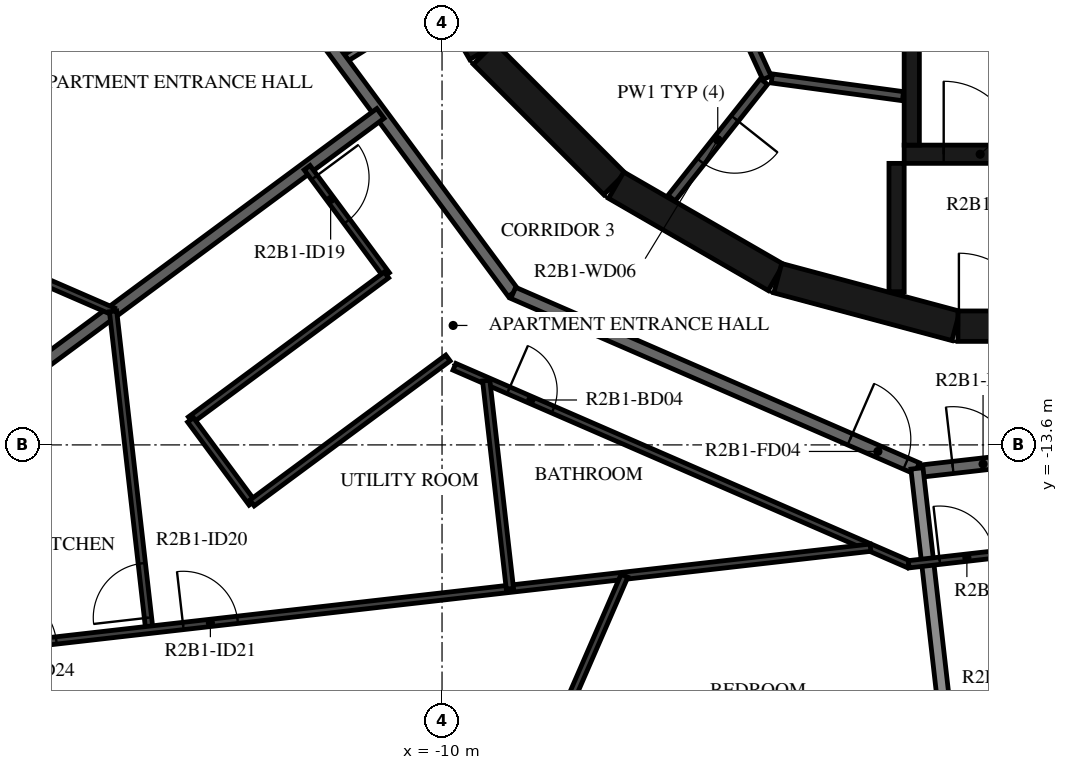
"""IFC4 building model, lengths in metres.
Left out: names, types, materials, properties, quantities, classifications, styles, units other than length and angle.
Written with IfcOpenShell. Run it as: python <this file> out.ifc"""

import sys

from ifc_helpers import new_model, si_unit, direction, frame, frame_2d, origin, place, context, subcontext, project, spatial, rectangle, extrude, element, fill, save


model = new_model("IFC4")
c1 = context("Model", 3, precision=1e-05, world=origin(), true_north=direction((0.0, 1.0)))
c2 = subcontext(c1, "Body", "Model", "MODEL_VIEW")
j1 = project(units=[si_unit("LENGTHUNIT", "METRE"), si_unit("PLANEANGLEUNIT", "RADIAN")], contexts=[c1])
p1 = place(None, origin())
s1 = spatial("IfcSite", under=j1, at=p1, CompositionType="ELEMENT")
p2 = place(p1, origin())
s2 = spatial("IfcBuilding", under=s1, at=p2, CompositionType="ELEMENT")
p3 = place(p2, frame((0.0, 0.0, 87.2)))
s3 = spatial("IfcBuildingStorey", under=s2, at=p3, CompositionType="ELEMENT", Elevation=87.2)
p4 = place(p3, frame((-10.845, -4.51, 0.0), z_axis=(0.0, 0.0, 1.0), x_axis=(0.500087131594, -0.865975092491, 0.0)))
e1 = element("IfcWall", 1, at=p4, inside=s3, PredefinedType="SHEAR", context=c2, shape_type="SweptSolid", body=[
    extrude(rectangle(XDim=3.033, YDim=0.5, at=frame_2d((1.516, 0.0))), origin(), (0.0, 0.0, 1.0), 3.12),
])
p5 = place(p3, frame((-9.308, -7.164, 0.0), z_axis=(0.0, 0.0, 1.0), x_axis=(0.707106781187, -0.707106781187, 0.0)))
e2 = element("IfcWall", 2, at=p5, inside=s3, PredefinedType="SHEAR", context=c2, shape_type="SweptSolid", body=[
    extrude(rectangle(XDim=3.032, YDim=0.5, at=frame_2d((1.516, 0.0))), origin(), (0.0, 0.0, 1.0), 3.12),
])
for number, where, z_axis, x_axis in (
    (3, (-7.137, -9.329, 0.0), (0.0, 0.0, 1.0), (0.866, -0.5, 0.0)),
    (4, (-4.479, -10.858, 0.0), (0.0, 0.0, 1.0), (0.966, -0.259, 0.0)),
):
    element("IfcWall", number, at=place(p3, frame(where, z_axis=z_axis, x_axis=x_axis)), inside=s3, PredefinedType="SHEAR", context=c2, shape_type="SweptSolid", body=[
        extrude(rectangle(XDim=3.033, YDim=0.5, at=frame_2d((1.516, 0.0))), origin(), (0.0, 0.0, 1.0), 3.12),
    ])
p6 = place(p3, frame((-1.516, -11.647, 0.0), z_axis=(0.0, 0.0, 1.0), x_axis=(1.0, 0.0, 0.0)))
e5 = element("IfcWall", 5, at=p6, inside=s3, PredefinedType="SHEAR", context=c2, shape_type="SweptSolid", body=[
    extrude(rectangle(XDim=3.033, YDim=0.5, at=frame_2d((1.516, 0.0))), origin(), (0.0, 0.0, 1.0), 3.12),
])
p7 = place(p6, frame((0.016, 0.0, 0.0)))
e6 = element("IfcOpeningElement", 6, at=p7, cuts=e5, PredefinedType="OPENING", context=c2, shape_type="SweptSolid", body=[
    extrude(rectangle(XDim=1.2, YDim=2.1, at=frame_2d((0.6, 1.05))), frame((0.0, 0.26, 0.0), z_axis=(0.0, -1.0, 0.0), x_axis=(1.0, 0.0, 0.0)), (0.0, 0.0, 1.0), 0.52),
])
p8 = place(p3, frame((-2.275, -8.67, 0.0), z_axis=(0.0, 0.0, 1.0), x_axis=(0.0, 1.0, 0.0)))
e7 = element("IfcWall", 7, at=p8, inside=s3, PredefinedType="SHEAR", context=c2, shape_type="SweptSolid", body=[
    extrude(rectangle(XDim=3.32, YDim=0.25, at=frame_2d((1.66, 0.0))), origin(), (0.0, 0.0, 1.0), 3.12),
])
p9 = place(p3, frame((-2.4, -8.82, 0.0), z_axis=(0.0, 0.0, 1.0), x_axis=(1.0, 0.0, 0.0)))
e8 = element("IfcWall", 8, at=p9, inside=s3, PredefinedType="SHEAR", context=c2, shape_type="SweptSolid", body=[
    extrude(rectangle(XDim=2.5, YDim=0.3, at=frame_2d((1.25, 0.0))), origin(), (0.0, 0.0, 1.0), 3.12),
])
p10 = place(p9, frame((0.65, 0.0, 0.0)))
e9 = element("IfcOpeningElement", 9, at=p10, cuts=e8, PredefinedType="OPENING", context=c2, shape_type="SweptSolid", body=[
    extrude(rectangle(XDim=1.2, YDim=2.1, at=frame_2d((0.6, 1.05))), frame((0.0, 0.16, 0.0), z_axis=(0.0, -1.0, 0.0), x_axis=(1.0, 0.0, 0.0)), (0.0, 0.0, 1.0), 0.32),
])
p11 = place(p3, frame((-2.525, -8.97, 0.0), z_axis=(0.0, 0.0, 1.0), x_axis=(0.0, -1.0, 0.0)))
e10 = element("IfcWall", 10, at=p11, inside=s3, PredefinedType="SHEAR", context=c2, shape_type="SweptSolid", body=[
    extrude(rectangle(XDim=2.11, YDim=0.25, at=frame_2d((1.055, 0.0))), origin(), (0.0, 0.0, 1.0), 3.12),
])
p12 = place(p3, frame((-5.795, -5.086, 0.0), z_axis=(0.0, 0.0, 1.0), x_axis=(0.417887867606, -0.908498613157, 0.0)))
e11 = element("IfcWall", 11, at=p12, inside=s3, PredefinedType="PARTITIONING", context=c2, shape_type="SweptSolid", body=[
    extrude(rectangle(XDim=2.726, YDim=0.15, at=frame_2d((1.363, 0.0))), origin(), (0.0, 0.0, 1.0), 3.12),
])
p13 = place(p12, frame((0.913, 0.0, 0.0)))
e12 = element("IfcOpeningElement", 12, at=p13, cuts=e11, PredefinedType="OPENING", context=c2, shape_type="SweptSolid", body=[
    extrude(rectangle(XDim=0.9, YDim=2.1, at=frame_2d((0.45, 1.05))), frame((0.0, 0.085, 0.0), z_axis=(0.0, -1.0, 0.0), x_axis=(1.0, 0.0, 0.0)), (0.0, 0.0, 1.0), 0.17),
])
p14 = place(p3, frame((-4.706, -7.625, 0.0), z_axis=(0.0, 0.0, 1.0), x_axis=(-0.621392599334, -0.783499353856, 0.0)))
e13 = element("IfcWall", 13, at=p14, inside=s3, PredefinedType="PARTITIONING", context=c2, shape_type="SweptSolid", body=[
    extrude(rectangle(XDim=2.447, YDim=0.15, at=frame_2d((1.224, 0.0))), origin(), (0.0, 0.0, 1.0), 3.12),
])
p15 = place(p14, frame((0.774, 0.0, 0.0)))
e14 = element("IfcOpeningElement", 14, at=p15, cuts=e13, PredefinedType="OPENING", context=c2, shape_type="SweptSolid", body=[
    extrude(rectangle(XDim=0.9, YDim=2.1, at=frame_2d((0.45, 1.05))), frame((0.0, 0.085, 0.0), z_axis=(0.0, -1.0, 0.0), x_axis=(1.0, 0.0, 0.0)), (0.0, 0.0, 1.0), 0.17),
])
p16 = place(p3, frame((-2.42, -7.865, 0.0), z_axis=(0.0, 0.0, 1.0), x_axis=(-0.990972299108, 0.134066783362, 0.0)))
e15 = element("IfcWall", 15, at=p16, inside=s3, PredefinedType="PARTITIONING", context=c2, shape_type="SweptSolid", body=[
    extrude(rectangle(XDim=2.176, YDim=0.15, at=frame_2d((1.088, 0.0))), origin(), (0.0, 0.0, 1.0), 3.12),
])
p17 = place(p3, frame((-11.654, -7.282, 0.0), z_axis=(0.0, 0.0, 1.0), x_axis=(0.848117698675, 0.529807860638, 0.0)))
e16 = element("IfcWall", 16, at=p17, inside=s3, PredefinedType="PARTITIONING", context=c2, shape_type="SweptSolid", body=[
    extrude(rectangle(XDim=1.838, YDim=0.12, at=frame_2d((0.919, 0.0))), origin(), (0.0, 0.0, 1.0), 3.12),
])
p18 = place(p17, frame((0.115, 0.0, 0.0)))
e17 = element("IfcOpeningElement", 17, at=p18, cuts=e16, PredefinedType="OPENING", context=c2, shape_type="SweptSolid", body=[
    extrude(rectangle(XDim=1.2, YDim=2.1, at=frame_2d((0.6, 1.05))), frame((0.0, 0.07, 0.0), z_axis=(0.0, -1.0, 0.0), x_axis=(1.0, 0.0, 0.0)), (0.0, 0.0, 1.0), 0.14),
])
p19 = place(p3, frame((-13.196, -5.198, 0.0), z_axis=(0.0, 0.0, 1.0), x_axis=(0.594805187394, -0.803869883159, 0.0)))
e18 = element("IfcWall", 18, at=p19, inside=s3, PredefinedType="STANDARD", context=c2, shape_type="SweptSolid", body=[
    extrude(rectangle(XDim=7.342, YDim=0.2, at=frame_2d((3.671, 0.0))), origin(), (0.0, 0.0, 1.0), 3.12),
])
p20 = place(p3, frame((-8.829, -11.1, 0.0), z_axis=(0.0, 0.0, 1.0), x_axis=(0.917063622491, -0.398740908742, 0.0)))
e19 = element("IfcWall", 19, at=p20, inside=s3, PredefinedType="STANDARD", context=c2, shape_type="SweptSolid", body=[
    extrude(rectangle(XDim=7.24, YDim=0.2, at=frame_2d((3.62, 0.0))), origin(), (0.0, 0.0, 1.0), 3.12),
])
p21 = place(p20, frame((6.04, 0.0, 0.0)))
e20 = element("IfcOpeningElement", 20, at=p21, cuts=e19, PredefinedType="OPENING", context=c2, shape_type="SweptSolid", body=[
    extrude(rectangle(XDim=1.0, YDim=2.1, at=frame_2d((0.5, 1.05))), frame((0.0, 0.11, 0.0), z_axis=(0.0, -1.0, 0.0), x_axis=(1.0, 0.0, 0.0)), (0.0, 0.0, 1.0), 0.22),
])
p22 = place(p3, frame((-2.096, -14.028, 0.0), z_axis=(0.0, 0.0, 1.0), x_axis=(0.993569170114, 0.113226782163, 0.0)))
e21 = element("IfcWall", 21, at=p22, inside=s3, PredefinedType="STANDARD", context=c2, shape_type="SweptSolid", body=[
    extrude(rectangle(XDim=7.342, YDim=0.2, at=frame_2d((3.671, 0.0))), origin(), (0.0, 0.0, 1.0), 3.12),
])
p23 = place(p22, frame((0.5, 0.0, 0.0)))
e22 = element("IfcOpeningElement", 22, at=p23, cuts=e21, PredefinedType="OPENING", context=c2, shape_type="SweptSolid", body=[
    extrude(rectangle(XDim=1.0, YDim=2.1, at=frame_2d((0.5, 1.05))), frame((0.0, 0.11, 0.0), z_axis=(0.0, -1.0, 0.0), x_axis=(1.0, 0.0, 0.0)), (0.0, 0.0, 1.0), 0.22),
])
p24 = place(p3, frame((-16.649, -12.32, 0.0), z_axis=(0.0, 0.0, 1.0), x_axis=(0.803869204071, 0.594806105169, 0.0)))
e23 = element("IfcWall", 23, at=p24, inside=s3, PredefinedType="STANDARD", context=c2, shape_type="SweptSolid", body=[
    extrude(rectangle(XDim=7.011, YDim=0.2, at=frame_2d((3.506, 0.0))), origin(), (0.0, 0.0, 1.0), 3.12),
])
p25 = place(p3, frame((-1.555, -19.559, 0.0), z_axis=(0.0, 0.0, 1.0), x_axis=(-0.113221250863, 0.993569800443, 0.0)))
e24 = element("IfcWall", 24, at=p25, inside=s3, PredefinedType="STANDARD", context=c2, shape_type="SweptSolid", body=[
    extrude(rectangle(XDim=5.609, YDim=0.2, at=frame_2d((2.804, 0.0))), origin(), (0.0, 0.0, 1.0), 2.73),
])
p26 = place(p3, frame((-20.245, -9.3, 0.0), z_axis=(0.0, 0.0, 1.0), x_axis=(0.91706784774, -0.398731190956, 0.0)))
e25 = element("IfcWall", 25, at=p26, inside=s3, PredefinedType="PARTITIONING", context=c2, shape_type="SweptSolid", body=[
    extrude(rectangle(XDim=5.272, YDim=0.12, at=frame_2d((2.636, 0.0))), origin(), (0.0, 0.0, 1.0), 3.12),
])
p27 = place(p26, frame((0.2, 0.0, 0.0)))
e26 = element("IfcOpeningElement", 26, at=p27, cuts=e25, PredefinedType="OPENING", context=c2, shape_type="SweptSolid", body=[
    extrude(rectangle(XDim=0.9, YDim=2.1, at=frame_2d((0.45, 1.05))), frame((0.0, 0.07, 0.0), z_axis=(0.0, -1.0, 0.0), x_axis=(1.0, 0.0, 0.0)), (0.0, 0.0, 1.0), 0.14),
])
p28 = place(p3, frame((-12.219, -9.041, 0.0), z_axis=(0.0, 0.0, 1.0), x_axis=(0.59482286703, -0.803856801214, 0.0)))
e27 = element("IfcWall", 27, at=p28, inside=s3, PredefinedType="PARTITIONING", context=c2, shape_type="SweptSolid", body=[
    extrude(rectangle(XDim=2.193, YDim=0.12, at=frame_2d((1.097, 0.0))), origin(), (0.0, 0.0, 1.0), 3.12),
])
p29 = place(p28, frame((0.2, 0.0, 0.0)))
e28 = element("IfcOpeningElement", 28, at=p29, cuts=e27, PredefinedType="OPENING", context=c2, shape_type="SweptSolid", body=[
    extrude(rectangle(XDim=0.9, YDim=2.1, at=frame_2d((0.45, 1.05))), frame((0.0, 0.07, 0.0), z_axis=(0.0, -1.0, 0.0), x_axis=(1.0, 0.0, 0.0)), (0.0, 0.0, 1.0), 0.14),
])
p30 = place(p3, frame((-10.914, -10.804, 0.0), z_axis=(0.0, 0.0, 1.0), x_axis=(-0.803864616889, -0.594812304609, 0.0)))
e29 = element("IfcWall", 29, at=p30, inside=s3, PredefinedType="PARTITIONING", context=c2, shape_type="SweptSolid", body=[
    extrude(rectangle(XDim=4.008, YDim=0.12, at=frame_2d((2.004, 0.0))), origin(), (0.0, 0.0, 1.0), 3.12),
])
p31 = place(p3, frame((-14.136, -13.188, 0.0), z_axis=(0.0, 0.0, 1.0), x_axis=(0.594863421241, -0.803826791087, 0.0)))
e30 = element("IfcWall", 30, at=p31, inside=s3, PredefinedType="PARTITIONING", context=c2, shape_type="SweptSolid", body=[
    extrude(rectangle(XDim=1.7, YDim=0.12, at=frame_2d((0.85, 0.0))), origin(), (0.0, 0.0, 1.0), 3.12),
])
p32 = place(p3, frame((-13.125, -14.555, 0.0), z_axis=(0.0, 0.0, 1.0), x_axis=(0.80389374229, 0.594772940799, 0.0)))
e31 = element("IfcWall", 31, at=p32, inside=s3, PredefinedType="PARTITIONING", context=c2, shape_type="SweptSolid", body=[
    extrude(rectangle(XDim=4.008, YDim=0.12, at=frame_2d((2.004, 0.0))), origin(), (0.0, 0.0, 1.0), 3.12),
])
p33 = place(p3, frame((-9.796, -12.315, 0.0), z_axis=(0.0, 0.0, 1.0), x_axis=(0.917059572812, -0.398750222463, 0.0)))
e32 = element("IfcWall", 32, at=p33, inside=s3, PredefinedType="PARTITIONING", context=c2, shape_type="SweptSolid", body=[
    extrude(rectangle(XDim=8.146, YDim=0.12, at=frame_2d((4.073, 0.0))), origin(), (0.0, 0.0, 1.0), 3.12),
])
p34 = place(p33, frame((0.969, 0.0, 0.0)))
e33 = element("IfcOpeningElement", 33, at=p34, cuts=e32, PredefinedType="OPENING", context=c2, shape_type="SweptSolid", body=[
    extrude(rectangle(XDim=0.8, YDim=2.1, at=frame_2d((0.4, 1.05))), frame((0.0, 0.07, 0.0), z_axis=(0.0, -1.0, 0.0), x_axis=(1.0, 0.0, 0.0)), (0.0, 0.0, 1.0), 0.14),
])
p35 = place(p3, frame((-2.326, -15.563, 0.0), z_axis=(0.0, 0.0, 1.0), x_axis=(0.993575068384, 0.113175012641, 0.0)))
e34 = element("IfcWall", 34, at=p35, inside=s3, PredefinedType="PARTITIONING", context=c2, shape_type="SweptSolid", body=[
    extrude(rectangle(XDim=3.799, YDim=0.12, at=frame_2d((1.899, 0.0))), origin(), (0.0, 0.0, 1.0), 3.12),
])
p36 = place(p35, frame((0.513, 0.0, 0.0)))
e35 = element("IfcOpeningElement", 35, at=p36, cuts=e34, PredefinedType="OPENING", context=c2, shape_type="SweptSolid", body=[
    extrude(rectangle(XDim=0.9, YDim=2.1, at=frame_2d((0.45, 1.05))), frame((0.0, 0.07, 0.0), z_axis=(0.0, -1.0, 0.0), x_axis=(1.0, 0.0, 0.0)), (0.0, 0.0, 1.0), 0.14),
])
p37 = place(p3, frame((-14.813, -16.641, 0.0), z_axis=(0.0, 0.0, 1.0), x_axis=(-0.113210971478, 0.993570971767, 0.0)))
e36 = element("IfcWall", 36, at=p37, inside=s3, PredefinedType="PARTITIONING", context=c2, shape_type="SweptSolid", body=[
    extrude(rectangle(XDim=5.273, YDim=0.12, at=frame_2d((2.636, 0.0))), origin(), (0.0, 0.0, 1.0), 3.12),
])
p38 = place(p37, frame((0.2, 0.0, 0.0)))
e37 = element("IfcOpeningElement", 37, at=p38, cuts=e36, PredefinedType="OPENING", context=c2, shape_type="SweptSolid", body=[
    extrude(rectangle(XDim=0.9, YDim=2.1, at=frame_2d((0.45, 1.05))), frame((0.0, 0.07, 0.0), z_axis=(0.0, -1.0, 0.0), x_axis=(1.0, 0.0, 0.0)), (0.0, 0.0, 1.0), 0.14),
])
p39 = place(p3, frame((-17.437, -16.94, 0.0), z_axis=(0.0, 0.0, 1.0), x_axis=(0.993573314119, 0.113190412448, 0.0)))
e38 = element("IfcWall", 38, at=p39, inside=s3, PredefinedType="PARTITIONING", context=c2, shape_type="SweptSolid", body=[
    extrude(rectangle(XDim=14.576, YDim=0.12, at=frame_2d((7.288, 0.0))), origin(), (0.0, 0.0, 1.0), 3.12),
])
p40 = place(p39, frame((3.201, 0.0, 0.0)))
e39 = element("IfcOpeningElement", 39, at=p40, cuts=e38, PredefinedType="OPENING", context=c2, shape_type="SweptSolid", body=[
    extrude(rectangle(XDim=0.9, YDim=2.1, at=frame_2d((0.45, 1.05))), frame((0.0, 0.07, 0.0), z_axis=(0.0, -1.0, 0.0), x_axis=(1.0, 0.0, 0.0)), (0.0, 0.0, 1.0), 0.14),
])
p41 = place(p39, frame((0.2, 0.0, 0.0)))
e40 = element("IfcOpeningElement", 40, at=p41, cuts=e38, PredefinedType="OPENING", context=c2, shape_type="SweptSolid", body=[
    extrude(rectangle(XDim=0.9, YDim=2.1, at=frame_2d((0.45, 1.05))), frame((0.0, 0.07, 0.0), z_axis=(0.0, -1.0, 0.0), x_axis=(1.0, 0.0, 0.0)), (0.0, 0.0, 1.0), 0.14),
])
p42 = place(p3, frame((-8.884, -15.966, 0.0), z_axis=(0.0, 0.0, 1.0), x_axis=(-0.113230836929, 0.993568708026, 0.0)))
e41 = element("IfcWall", 41, at=p42, inside=s3, PredefinedType="PARTITIONING", context=c2, shape_type="SweptSolid", body=[
    extrude(rectangle(XDim=3.446, YDim=0.12, at=frame_2d((1.723, 0.0))), origin(), (0.0, 0.0, 1.0), 3.12),
])
p43 = place(p3, frame((-9.026, -20.41, 0.0), z_axis=(0.0, 0.0, 1.0), x_axis=(0.398750711167, 0.917059360316, 0.0)))
e42 = element("IfcWall", 42, at=p43, inside=s3, PredefinedType="PARTITIONING", context=c2, shape_type="SweptSolid", body=[
    extrude(rectangle(XDim=5.081, YDim=0.12, at=frame_2d((2.54, 0.0))), origin(), (0.0, 0.0, 1.0), 3.12),
])
p44 = place(p43, frame((0.4, 0.0, 0.0)))
e43 = element("IfcOpeningElement", 43, at=p44, cuts=e42, PredefinedType="OPENING", context=c2, shape_type="SweptSolid", body=[
    extrude(rectangle(XDim=0.9, YDim=2.1, at=frame_2d((0.45, 1.05))), frame((0.0, 0.07, 0.0), z_axis=(0.0, -1.0, 0.0), x_axis=(1.0, 0.0, 0.0)), (0.0, 0.0, 1.0), 0.14),
])
p45 = place(p10, origin())
e44 = element("IfcDoor", 44, at=p45, inside=s3, OperationType="SINGLE_SWING_LEFT", PredefinedType="DOOR", context=c2, shape_type="SweptSolid", body=[
    extrude(rectangle(XDim=1.2, YDim=2.1, at=frame_2d((0.6, 1.05))), frame((0.0, 0.025, 0.0), z_axis=(0.0, -1.0, 0.0), x_axis=(1.0, 0.0, 0.0)), (0.0, 0.0, 1.0), 0.05),
])
fill(e9, e44)
p46 = place(p7, origin())
e45 = element("IfcDoor", 45, at=p46, inside=s3, OperationType="SINGLE_SWING_RIGHT", PredefinedType="DOOR", context=c2, shape_type="SweptSolid", body=[
    extrude(rectangle(XDim=1.2, YDim=2.1, at=frame_2d((0.6, 1.05))), frame((0.0, 0.025, 0.0), z_axis=(0.0, -1.0, 0.0), x_axis=(1.0, 0.0, 0.0)), (0.0, 0.0, 1.0), 0.05),
])
fill(e6, e45)
p47 = place(p15, origin())
e46 = element("IfcDoor", 46, at=p47, inside=s3, OperationType="SINGLE_SWING_LEFT", PredefinedType="DOOR", context=c2, shape_type="SweptSolid", body=[
    extrude(rectangle(XDim=0.9, YDim=2.1, at=frame_2d((0.45, 1.05))), frame((0.0, 0.025, 0.0), z_axis=(0.0, -1.0, 0.0), x_axis=(1.0, 0.0, 0.0)), (0.0, 0.0, 1.0), 0.05),
])
fill(e14, e46)
p48 = place(p21, origin())
e47 = element("IfcDoor", 47, at=p48, inside=s3, OperationType="SINGLE_SWING_LEFT", PredefinedType="DOOR", context=c2, shape_type="SweptSolid", body=[
    extrude(rectangle(XDim=1.0, YDim=2.1, at=frame_2d((0.5, 1.05))), frame((0.0, 0.025, 0.0), z_axis=(0.0, -1.0, 0.0), x_axis=(1.0, 0.0, 0.0)), (0.0, 0.0, 1.0), 0.05),
])
fill(e20, e47)
p49 = place(p29, origin())
e48 = element("IfcDoor", 48, at=p49, inside=s3, OperationType="SINGLE_SWING_LEFT", PredefinedType="DOOR", context=c2, shape_type="SweptSolid", body=[
    extrude(rectangle(XDim=0.9, YDim=2.1, at=frame_2d((0.45, 1.05))), frame((0.0, 0.025, 0.0), z_axis=(0.0, -1.0, 0.0), x_axis=(1.0, 0.0, 0.0)), (0.0, 0.0, 1.0), 0.05),
])
fill(e28, e48)
p50 = place(p34, origin())
e49 = element("IfcDoor", 49, at=p50, inside=s3, OperationType="SINGLE_SWING_LEFT", PredefinedType="DOOR", context=c2, shape_type="SweptSolid", body=[
    extrude(rectangle(XDim=0.8, YDim=2.1, at=frame_2d((0.4, 1.05))), frame((0.0, 0.025, 0.0), z_axis=(0.0, -1.0, 0.0), x_axis=(1.0, 0.0, 0.0)), (0.0, 0.0, 1.0), 0.05),
])
fill(e33, e49)
p51 = place(p38, origin())
e50 = element("IfcDoor", 50, at=p51, inside=s3, OperationType="SINGLE_SWING_LEFT", PredefinedType="DOOR", context=c2, shape_type="SweptSolid", body=[
    extrude(rectangle(XDim=0.9, YDim=2.1, at=frame_2d((0.45, 1.05))), frame((0.0, 0.025, 0.0), z_axis=(0.0, -1.0, 0.0), x_axis=(1.0, 0.0, 0.0)), (0.0, 0.0, 1.0), 0.05),
])
fill(e37, e50)
p52 = place(p40, origin())
e51 = element("IfcDoor", 51, at=p52, inside=s3, OperationType="SINGLE_SWING_LEFT", PredefinedType="DOOR", context=c2, shape_type="SweptSolid", body=[
    extrude(rectangle(XDim=0.9, YDim=2.1, at=frame_2d((0.45, 1.05))), frame((0.0, 0.025, 0.0), z_axis=(0.0, -1.0, 0.0), x_axis=(1.0, 0.0, 0.0)), (0.0, 0.0, 1.0), 0.05),
])
fill(e39, e51)
p53 = place(p41, origin())
e52 = element("IfcDoor", 52, at=p53, inside=s3, OperationType="SINGLE_SWING_LEFT", PredefinedType="DOOR", context=c2, shape_type="SweptSolid", body=[
    extrude(rectangle(XDim=0.9, YDim=2.1, at=frame_2d((0.45, 1.05))), frame((0.0, 0.025, 0.0), z_axis=(0.0, -1.0, 0.0), x_axis=(1.0, 0.0, 0.0)), (0.0, 0.0, 1.0), 0.05),
])
fill(e40, e52)
p54 = place(p23, origin())
e53 = element("IfcDoor", 53, at=p54, inside=s3, OperationType="SINGLE_SWING_LEFT", PredefinedType="DOOR", context=c2, shape_type="SweptSolid", body=[
    extrude(rectangle(XDim=1.0, YDim=2.1, at=frame_2d((0.5, 1.05))), frame((0.0, 0.025, 0.0), z_axis=(0.0, -1.0, 0.0), x_axis=(1.0, 0.0, 0.0)), (0.0, 0.0, 1.0), 0.05),
])
fill(e22, e53)
p55 = place(p36, origin())
e54 = element("IfcDoor", 54, at=p55, inside=s3, OperationType="SINGLE_SWING_LEFT", PredefinedType="DOOR", context=c2, shape_type="SweptSolid", body=[
    extrude(rectangle(XDim=0.9, YDim=2.1, at=frame_2d((0.45, 1.05))), frame((0.0, 0.025, 0.0), z_axis=(0.0, -1.0, 0.0), x_axis=(1.0, 0.0, 0.0)), (0.0, 0.0, 1.0), 0.05),
])
fill(e35, e54)
p56 = place(p18, origin())
e55 = element("IfcDoor", 55, at=p56, inside=s3, OperationType="DOUBLE_DOOR_SINGLE_SWING", PredefinedType="DOOR", context=c2, shape_type="SweptSolid", body=[
    extrude(rectangle(XDim=1.2, YDim=2.1, at=frame_2d((0.6, 1.05))), frame((0.0, 0.025, 0.0), z_axis=(0.0, -1.0, 0.0), x_axis=(1.0, 0.0, 0.0)), (0.0, 0.0, 1.0), 0.05),
])
fill(e17, e55)
save(model, sys.argv[1])
